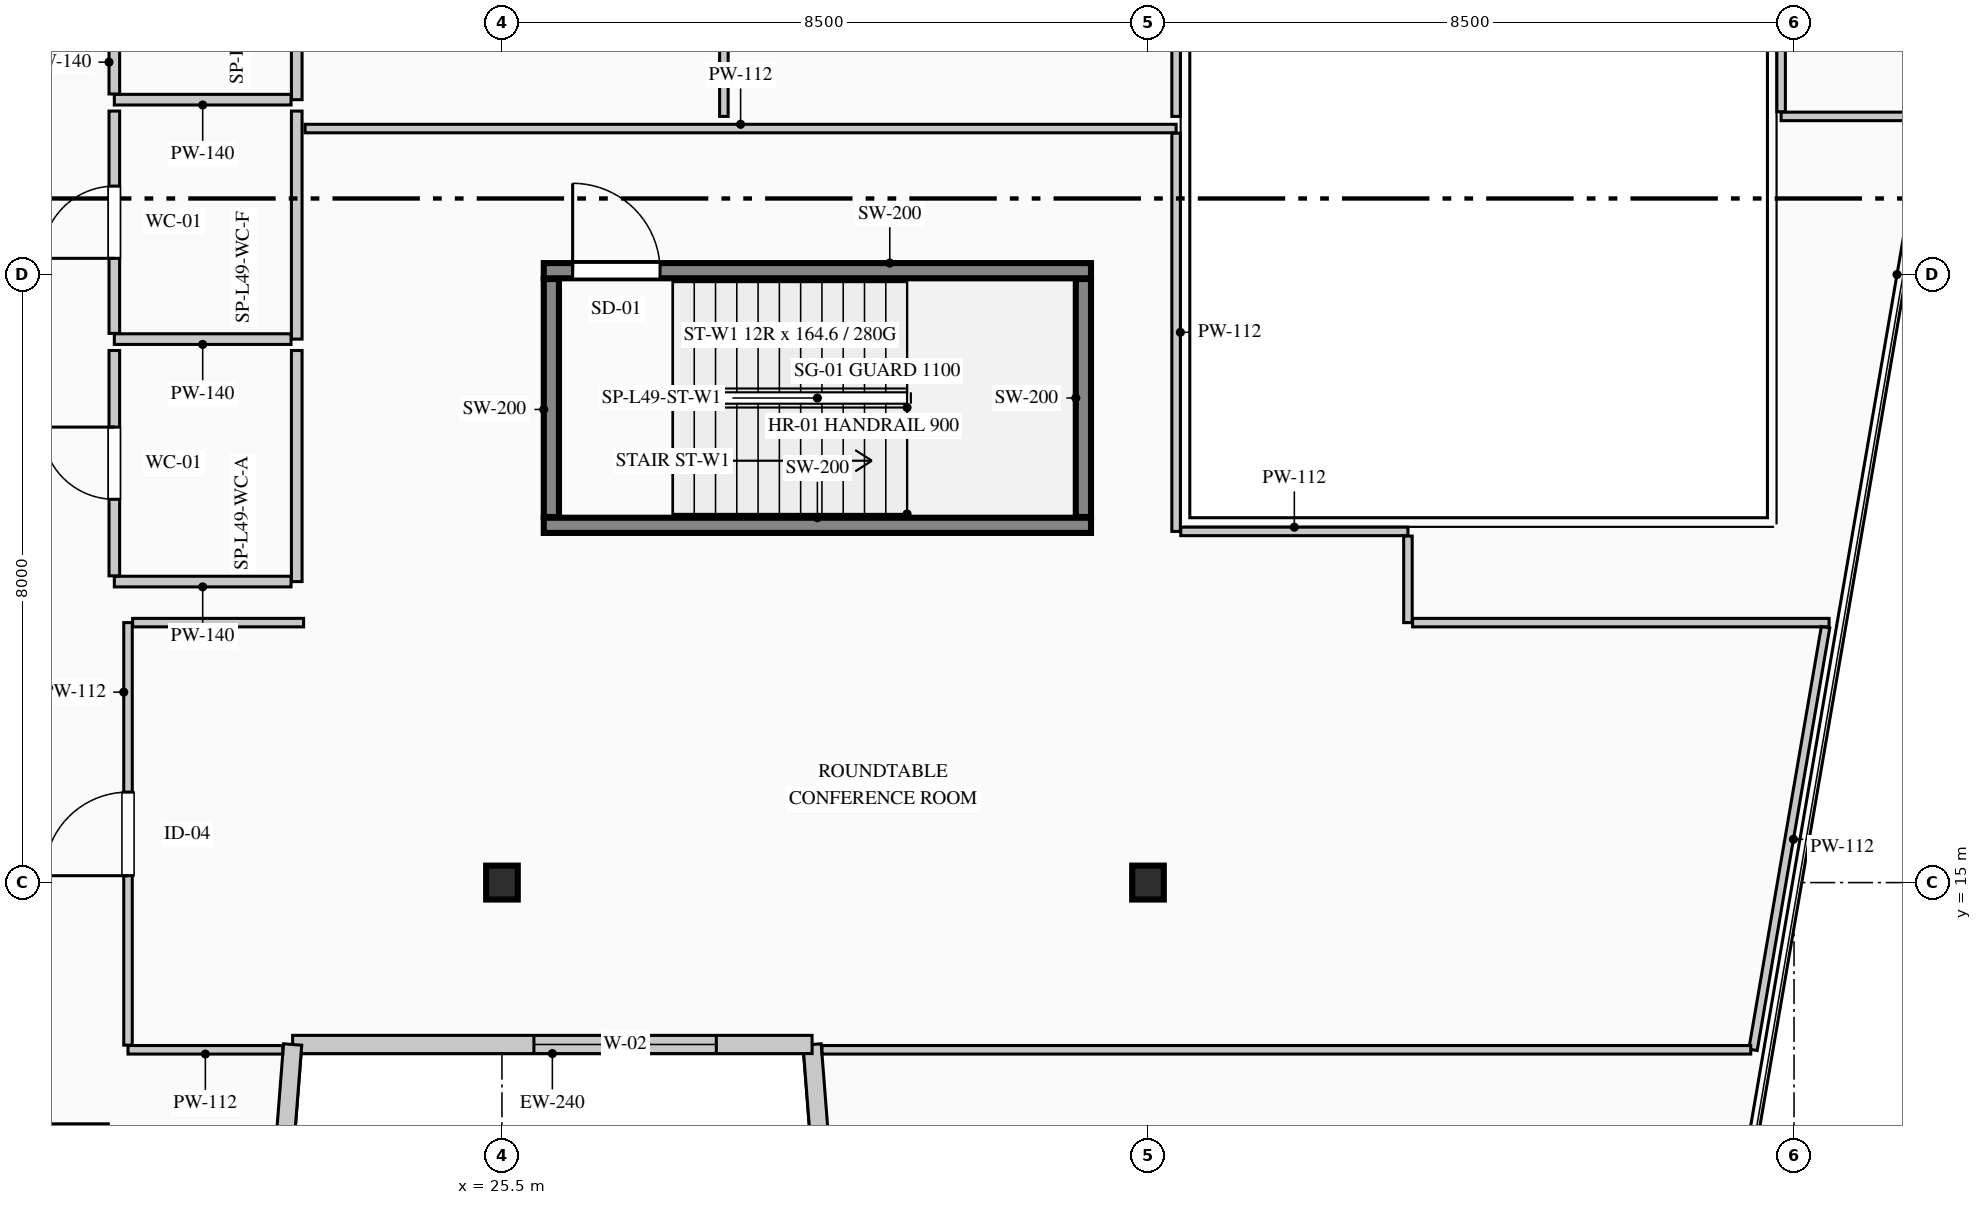
"""IFC4 building model, lengths in metres.
Left out: names, types, materials, properties, quantities, classifications, styles, units other than length and angle.
Written with IfcOpenShell. Run it as: python <this file> out.ifc"""

import sys

from ifc_helpers import new_model, si_unit, direction, frame, frame_2d, origin, origin_2d, place, context, subcontext, project, spatial, rectangle, i_section, extrude, element, fill, save


model = new_model("IFC4")
c1 = context("Model", 3, precision=1e-05, world=origin(), true_north=direction((0.0, 1.0)))
c2 = subcontext(c1, "Body", "Model", "MODEL_VIEW")
j1 = project(units=[si_unit("LENGTHUNIT", "METRE"), si_unit("PLANEANGLEUNIT", "RADIAN")], contexts=[c1])
p1 = place(None, origin())
s1 = spatial("IfcSite", under=j1, at=p1, CompositionType="ELEMENT")
p2 = place(p1, origin())
s2 = spatial("IfcBuilding", under=s1, at=p2, CompositionType="ELEMENT")
p3 = place(p2, frame((0.0, 0.0, 207.45)))
s3 = spatial("IfcBuildingStorey", under=s2, at=p3, CompositionType="ELEMENT", Elevation=207.45)
p4 = place(p3, frame((26.05, 19.7, 0.0), z_axis=(0.0, 0.0, 1.0), x_axis=(1.0, 0.0, 0.0)))
e1 = element("IfcWall", 1, at=p4, inside=s3, PredefinedType="SHEAR", context=c2, shape_type="SweptSolid", body=[
    extrude(rectangle(XDim=7.2, YDim=0.2, at=frame_2d((3.6, 0.0))), origin(), (0.0, 0.0, 1.0), 3.95),
])
p5 = place(p3, frame((26.05, 23.05, 0.0), z_axis=(0.0, 0.0, 1.0), x_axis=(1.0, 0.0, 0.0)))
e2 = element("IfcWall", 2, at=p5, inside=s3, PredefinedType="SHEAR", context=c2, shape_type="SweptSolid", body=[
    extrude(rectangle(XDim=7.2, YDim=0.2, at=frame_2d((3.6, 0.0))), origin(), (0.0, 0.0, 1.0), 3.95),
])
p6 = place(p5, frame((0.38, 0.0, 0.0)))
e3 = element("IfcOpeningElement", 3, at=p6, cuts=e2, PredefinedType="OPENING", context=c2, shape_type="SweptSolid", body=[
    extrude(rectangle(XDim=1.15, YDim=2.2, at=frame_2d((0.575, 1.1))), frame((0.0, 0.11, 0.0), z_axis=(0.0, -1.0, 0.0), x_axis=(1.0, 0.0, 0.0)), (0.0, 0.0, 1.0), 0.22),
])
for number, where, z_axis, x_axis in (
    (4, (26.15, 19.81, 0.0), (0.0, 0.0, 1.0), (0.0, 1.0, 0.0)),
    (5, (33.15, 19.81, 0.0), (0.0, 0.0, 1.0), (0.0, 1.0, 0.0)),
):
    element("IfcWall", number, at=place(p3, frame(where, z_axis=z_axis, x_axis=x_axis)), inside=s3, PredefinedType="SHEAR", context=c2, shape_type="SweptSolid", body=[
        extrude(rectangle(XDim=3.13, YDim=0.2, at=frame_2d((1.565, 0.0))), origin(), (0.0, 0.0, 1.0), 3.95),
    ])
for number, where, z_axis, x_axis in (
    (6, (25.5, 15.0, 0.0), (0.0, 0.0, 1.0), (1.0, 0.0, 0.0)),
    (7, (34.0, 15.0, 0.0), (0.0, 0.0, 1.0), (1.0, 0.0, 0.0)),
):
    element("IfcColumn", number, at=place(p3, frame(where, z_axis=z_axis, x_axis=x_axis)), inside=s3, PredefinedType="COLUMN", context=c2, shape_type="SweptSolid", body=[
        extrude(i_section(OverallWidth=0.416, OverallDepth=0.446, WebThickness=0.039, FlangeThickness=0.063, FilletRadius=0.015, at=origin_2d()), origin(), (0.0, 0.0, 1.0), 3.95),
    ])
p7 = place(p3, frame((30.381, 2.62, 0.0), z_axis=(0.0, 0.0, 1.0), x_axis=(-0.077816860153, 0.996967670627, 0.0)))
e8 = element("IfcWall", 8, at=p7, inside=s3, PredefinedType="STANDARD", context=c2, shape_type="SweptSolid", body=[
    extrude(rectangle(XDim=10.281, YDim=0.24, at=frame_2d((5.141, 0.0))), origin(), (0.0, 0.0, 1.0), 3.7),
])
p8 = place(p7, frame((5.38, 0.0, 0.9)))
e9 = element("IfcOpeningElement", 9, at=p8, cuts=e8, PredefinedType="OPENING", context=c2, shape_type="SweptSolid", body=[
    extrude(rectangle(XDim=2.4, YDim=2.1, at=frame_2d((1.2, 1.05))), frame((0.0, 0.13, 0.0), z_axis=(0.0, -1.0, 0.0), x_axis=(1.0, 0.0, 0.0)), (0.0, 0.0, 1.0), 0.26),
])
p9 = place(p3, frame((29.581, 12.87, 0.0), z_axis=(0.0, 0.0, 1.0), x_axis=(-1.0, 0.0, 0.0)))
e10 = element("IfcWall", 10, at=p9, inside=s3, PredefinedType="STANDARD", context=c2, shape_type="SweptSolid", body=[
    extrude(rectangle(XDim=6.834, YDim=0.24, at=frame_2d((3.417, 0.0))), origin(), (0.0, 0.0, 1.0), 3.7),
])
p10 = place(p9, frame((1.26, 0.0, 0.9)))
e11 = element("IfcOpeningElement", 11, at=p10, cuts=e10, PredefinedType="OPENING", context=c2, shape_type="SweptSolid", body=[
    extrude(rectangle(XDim=2.4, YDim=2.1, at=frame_2d((1.2, 1.05))), frame((0.0, 0.13, 0.0), z_axis=(0.0, -1.0, 0.0), x_axis=(1.0, 0.0, 0.0)), (0.0, 0.0, 1.0), 0.26),
])
p11 = place(p3, frame((22.746, 12.87, 0.0), z_axis=(0.0, 0.0, 1.0), x_axis=(-0.077816860153, -0.996967670627, 0.0)))
e12 = element("IfcWall", 12, at=p11, inside=s3, PredefinedType="STANDARD", context=c2, shape_type="SweptSolid", body=[
    extrude(rectangle(XDim=10.281, YDim=0.24, at=frame_2d((5.141, 0.0))), origin(), (0.0, 0.0, 1.0), 3.7),
])
p12 = place(p11, frame((2.501, 0.0, 0.9)))
e13 = element("IfcOpeningElement", 13, at=p12, cuts=e12, PredefinedType="OPENING", context=c2, shape_type="SweptSolid", body=[
    extrude(rectangle(XDim=2.4, YDim=2.1, at=frame_2d((1.2, 1.05))), frame((0.0, 0.13, 0.0), z_axis=(0.0, -1.0, 0.0), x_axis=(1.0, 0.0, 0.0)), (0.0, 0.0, 1.0), 0.26),
])
p13 = place(p3, frame((22.8, 28.95, 0.0), z_axis=(0.0, 0.0, 1.0), x_axis=(0.0, -1.0, 0.0)))
e14 = element("IfcWall", 14, at=p13, inside=s3, PredefinedType="PARTITIONING", context=c2, shape_type="SweptSolid", body=[
    extrude(rectangle(XDim=3.65, YDim=0.14, at=frame_2d((1.825, 0.0))), origin(), (0.0, 0.0, 1.0), 3.325),
])
p14 = place(p3, frame((22.725, 25.3, 0.0), z_axis=(0.0, 0.0, 1.0), x_axis=(-1.0, 0.0, 0.0)))
e15 = element("IfcWall", 15, at=p14, inside=s3, PredefinedType="PARTITIONING", context=c2, shape_type="SweptSolid", body=[
    extrude(rectangle(XDim=2.325, YDim=0.14, at=frame_2d((1.163, 0.0))), origin(), (0.0, 0.0, 1.0), 3.7),
])
p15 = place(p3, frame((20.4, 25.375, 0.0), z_axis=(0.0, 0.0, 1.0), x_axis=(0.0, 1.0, 0.0)))
e16 = element("IfcWall", 16, at=p15, inside=s3, PredefinedType="PARTITIONING", context=c2, shape_type="SweptSolid", body=[
    extrude(rectangle(XDim=3.575, YDim=0.14, at=frame_2d((1.788, 0.0))), origin(), (0.0, 0.0, 1.0), 3.7),
])
p16 = place(p15, frame((1.312, 0.0, 0.0)))
e17 = element("IfcOpeningElement", 17, at=p16, cuts=e16, PredefinedType="OPENING", context=c2, shape_type="SweptSolid", body=[
    extrude(rectangle(XDim=0.95, YDim=2.15, at=frame_2d((0.475, 1.075))), frame((0.0, 0.08, 0.0), z_axis=(0.0, -1.0, 0.0), x_axis=(1.0, 0.0, 0.0)), (0.0, 0.0, 1.0), 0.16),
])
p17 = place(p3, frame((22.8, 25.15, 0.0), z_axis=(0.0, 0.0, 1.0), x_axis=(0.0, -1.0, 0.0)))
e18 = element("IfcWall", 18, at=p17, inside=s3, PredefinedType="PARTITIONING", context=c2, shape_type="SweptSolid", body=[
    extrude(rectangle(XDim=3.0, YDim=0.14, at=frame_2d((1.5, 0.0))), origin(), (0.0, 0.0, 1.0), 3.325),
])
p18 = place(p3, frame((22.725, 22.15, 0.0), z_axis=(0.0, 0.0, 1.0), x_axis=(-1.0, 0.0, 0.0)))
e19 = element("IfcWall", 19, at=p18, inside=s3, PredefinedType="PARTITIONING", context=c2, shape_type="SweptSolid", body=[
    extrude(rectangle(XDim=2.325, YDim=0.14, at=frame_2d((1.163, 0.0))), origin(), (0.0, 0.0, 1.0), 3.7),
])
p19 = place(p3, frame((20.4, 22.225, 0.0), z_axis=(0.0, 0.0, 1.0), x_axis=(0.0, 1.0, 0.0)))
e20 = element("IfcWall", 20, at=p19, inside=s3, PredefinedType="PARTITIONING", context=c2, shape_type="SweptSolid", body=[
    extrude(rectangle(XDim=2.925, YDim=0.14, at=frame_2d((1.462, 0.0))), origin(), (0.0, 0.0, 1.0), 3.7),
])
p20 = place(p19, frame((0.988, 0.0, 0.0)))
e21 = element("IfcOpeningElement", 21, at=p20, cuts=e20, PredefinedType="OPENING", context=c2, shape_type="SweptSolid", body=[
    extrude(rectangle(XDim=0.95, YDim=2.15, at=frame_2d((0.475, 1.075))), frame((0.0, 0.08, 0.0), z_axis=(0.0, -1.0, 0.0), x_axis=(1.0, 0.0, 0.0)), (0.0, 0.0, 1.0), 0.16),
])
p21 = place(p3, frame((22.8, 22.0, 0.0), z_axis=(0.0, 0.0, 1.0), x_axis=(0.0, -1.0, 0.0)))
e22 = element("IfcWall", 22, at=p21, inside=s3, PredefinedType="PARTITIONING", context=c2, shape_type="SweptSolid", body=[
    extrude(rectangle(XDim=3.04, YDim=0.14, at=frame_2d((1.52, 0.0))), origin(), (0.0, 0.0, 1.0), 3.325),
])
p22 = place(p3, frame((22.725, 18.96, 0.0), z_axis=(0.0, 0.0, 1.0), x_axis=(-1.0, 0.0, 0.0)))
e23 = element("IfcWall", 23, at=p22, inside=s3, PredefinedType="PARTITIONING", context=c2, shape_type="SweptSolid", body=[
    extrude(rectangle(XDim=2.325, YDim=0.14, at=frame_2d((1.163, 0.0))), origin(), (0.0, 0.0, 1.0), 3.7),
])
p23 = place(p3, frame((20.4, 19.035, 0.0), z_axis=(0.0, 0.0, 1.0), x_axis=(0.0, 1.0, 0.0)))
e24 = element("IfcWall", 24, at=p23, inside=s3, PredefinedType="PARTITIONING", context=c2, shape_type="SweptSolid", body=[
    extrude(rectangle(XDim=2.965, YDim=0.14, at=frame_2d((1.482, 0.0))), origin(), (0.0, 0.0, 1.0), 3.7),
])
p24 = place(p23, frame((1.008, 0.0, 0.0)))
e25 = element("IfcOpeningElement", 25, at=p24, cuts=e24, PredefinedType="OPENING", context=c2, shape_type="SweptSolid", body=[
    extrude(rectangle(XDim=0.95, YDim=2.15, at=frame_2d((0.475, 1.075))), frame((0.0, 0.08, 0.0), z_axis=(0.0, -1.0, 0.0), x_axis=(1.0, 0.0, 0.0)), (0.0, 0.0, 1.0), 0.16),
])
p25 = place(p3, frame((11.341, 11.77, 0.0), z_axis=(0.0, 0.0, 1.0), x_axis=(1.0, 0.0, 0.0)))
e26 = element("IfcWall", 26, at=p25, inside=s3, PredefinedType="PARTITIONING", context=c2, shape_type="SweptSolid", body=[
    extrude(rectangle(XDim=8.979, YDim=0.112, at=frame_2d((4.49, 0.0))), origin(), (0.0, 0.0, 1.0), 3.7),
])
p26 = place(p25, frame((3.939, 0.0, 0.0)))
e27 = element("IfcOpeningElement", 27, at=p26, cuts=e26, PredefinedType="OPENING", context=c2, shape_type="SweptSolid", body=[
    extrude(rectangle(XDim=1.1, YDim=2.2, at=frame_2d((0.55, 1.1))), frame((0.0, 0.066, 0.0), z_axis=(0.0, -1.0, 0.0), x_axis=(1.0, 0.0, 0.0)), (0.0, 0.0, 1.0), 0.132),
])
p27 = place(p3, frame((22.615, 12.8, 0.0), z_axis=(0.0, 0.0, 1.0), x_axis=(-1.0, 0.0, 0.0)))
e28 = element("IfcWall", 28, at=p27, inside=s3, PredefinedType="PARTITIONING", context=c2, shape_type="SweptSolid", body=[
    extrude(rectangle(XDim=2.035, YDim=0.112, at=frame_2d((1.018, 0.0))), origin(), (0.0, 0.0, 1.0), 3.7),
])
p28 = place(p3, frame((20.58, 12.861, 0.0), z_axis=(0.0, 0.0, 1.0), x_axis=(0.0, 1.0, 0.0)))
e29 = element("IfcWall", 29, at=p28, inside=s3, PredefinedType="PARTITIONING", context=c2, shape_type="SweptSolid", body=[
    extrude(rectangle(XDim=5.559, YDim=0.112, at=frame_2d((2.779, 0.0))), origin(), (0.0, 0.0, 1.0), 3.7),
])
p29 = place(p28, frame((2.229, 0.0, 0.0)))
e30 = element("IfcOpeningElement", 30, at=p29, cuts=e29, PredefinedType="OPENING", context=c2, shape_type="SweptSolid", body=[
    extrude(rectangle(XDim=1.1, YDim=2.2, at=frame_2d((0.55, 1.1))), frame((0.0, 0.066, 0.0), z_axis=(0.0, -1.0, 0.0), x_axis=(1.0, 0.0, 0.0)), (0.0, 0.0, 1.0), 0.132),
])
p30 = place(p3, frame((20.641, 18.42, 0.0), z_axis=(0.0, 0.0, 1.0), x_axis=(1.0, 0.0, 0.0)))
e31 = element("IfcWall", 31, at=p30, inside=s3, PredefinedType="PARTITIONING", context=c2, shape_type="SweptSolid", body=[
    extrude(rectangle(XDim=2.249, YDim=0.112, at=frame_2d((1.125, 0.0))), origin(), (0.0, 0.0, 1.0), 3.7),
])
p31 = place(p3, frame((22.91, 24.92, 0.0), z_axis=(0.0, 0.0, 1.0), x_axis=(1.0, 0.0, 0.0)))
e32 = element("IfcWall", 32, at=p31, inside=s3, PredefinedType="PARTITIONING", context=c2, shape_type="SweptSolid", body=[
    extrude(rectangle(XDim=11.46, YDim=0.112, at=frame_2d((5.73, 0.0))), origin(), (0.0, 0.0, 1.0), 3.325),
])
p32 = place(p3, frame((34.37, 24.859, 0.0), z_axis=(0.0, 0.0, 1.0), x_axis=(0.0, -1.0, 0.0)))
e33 = element("IfcWall", 33, at=p32, inside=s3, PredefinedType="PARTITIONING", context=c2, shape_type="SweptSolid", body=[
    extrude(rectangle(XDim=5.239, YDim=0.112, at=frame_2d((2.619, 0.0))), origin(), (0.0, 0.0, 1.0), 3.7),
])
p33 = place(p3, frame((34.431, 19.62, 0.0), z_axis=(0.0, 0.0, 1.0), x_axis=(1.0, 0.0, 0.0)))
e34 = element("IfcWall", 34, at=p33, inside=s3, PredefinedType="PARTITIONING", context=c2, shape_type="SweptSolid", body=[
    extrude(rectangle(XDim=2.989, YDim=0.112, at=frame_2d((1.495, 0.0))), origin(), (0.0, 0.0, 1.0), 3.7),
])
p34 = place(p3, frame((37.42, 19.559, 0.0), z_axis=(0.0, 0.0, 1.0), x_axis=(0.0, -1.0, 0.0)))
e35 = element("IfcWall", 35, at=p34, inside=s3, PredefinedType="PARTITIONING", context=c2, shape_type="SweptSolid", body=[
    extrude(rectangle(XDim=1.139, YDim=0.112, at=frame_2d((0.57, 0.0))), origin(), (0.0, 0.0, 1.0), 3.7),
])
p35 = place(p3, frame((37.481, 18.42, 0.0), z_axis=(0.0, 0.0, 1.0), x_axis=(1.0, 0.0, 0.0)))
e36 = element("IfcWall", 36, at=p35, inside=s3, PredefinedType="PARTITIONING", context=c2, shape_type="SweptSolid", body=[
    extrude(rectangle(XDim=5.48, YDim=0.112, at=frame_2d((2.74, 0.0))), origin(), (0.0, 0.0, 1.0), 3.7),
])
p36 = place(p3, frame((42.915, 18.359, 0.0), z_axis=(0.0, 0.0, 1.0), x_axis=(-0.169247345334, -0.985573607651, 0.0)))
e37 = element("IfcWall", 37, at=p36, inside=s3, PredefinedType="PARTITIONING", context=c2, shape_type="SweptSolid", body=[
    extrude(rectangle(XDim=5.64, YDim=0.112, at=frame_2d((2.82, 0.0))), origin(), (0.0, 0.0, 1.0), 3.7),
])
p37 = place(p3, frame((41.93, 12.8, 0.0), z_axis=(0.0, 0.0, 1.0), x_axis=(-1.0, 0.0, 0.0)))
e38 = element("IfcWall", 38, at=p37, inside=s3, PredefinedType="PARTITIONING", context=c2, shape_type="SweptSolid", body=[
    extrude(rectangle(XDim=12.219, YDim=0.112, at=frame_2d((6.11, 0.0))), origin(), (0.0, 0.0, 1.0), 3.7),
])
p38 = place(p3, frame((28.42, 28.959, 0.0), z_axis=(0.0, 0.0, 1.0), x_axis=(0.0, -1.0, 0.0)))
e39 = element("IfcWall", 39, at=p38, inside=s3, PredefinedType="PARTITIONING", context=c2, shape_type="SweptSolid", body=[
    extrude(rectangle(XDim=3.879, YDim=0.112, at=frame_2d((1.939, 0.0))), origin(), (0.0, 0.0, 1.0), 3.7),
])
p39 = place(p3, frame((34.37, 28.6, 0.0), z_axis=(0.0, 0.0, 1.0), x_axis=(0.0, -1.0, 0.0)))
e40 = element("IfcWall", 40, at=p39, inside=s3, PredefinedType="PARTITIONING", context=c2, shape_type="SweptSolid", body=[
    extrude(rectangle(XDim=3.52, YDim=0.112, at=frame_2d((1.76, 0.0))), origin(), (0.0, 0.0, 1.0), 3.7),
])
p40 = place(p3, frame((44.041, 25.08, 0.0), z_axis=(0.0, 0.0, 1.0), x_axis=(-1.0, 0.0, 0.0)))
e41 = element("IfcWall", 41, at=p40, inside=s3, PredefinedType="PARTITIONING", context=c2, shape_type="SweptSolid", body=[
    extrude(rectangle(XDim=1.71, YDim=0.112, at=frame_2d((0.855, 0.0))), origin(), (0.0, 0.0, 1.0), 3.7),
])
p41 = place(p3, frame((42.33, 25.141, 0.0), z_axis=(0.0, 0.0, 1.0), x_axis=(0.0, 1.0, 0.0)))
e42 = element("IfcWall", 42, at=p41, inside=s3, PredefinedType="PARTITIONING", context=c2, shape_type="SweptSolid", body=[
    extrude(rectangle(XDim=3.489, YDim=0.112, at=frame_2d((1.744, 0.0))), origin(), (0.0, 0.0, 1.0), 3.7),
])
p42 = place(p10, origin())
e43 = element("IfcWindow", 43, at=p42, inside=s3, PartitioningType="DOUBLE_PANEL_VERTICAL", PredefinedType="WINDOW", context=c2, shape_type="SweptSolid", body=[
    extrude(rectangle(XDim=2.4, YDim=2.1, at=frame_2d((1.2, 1.05))), frame((0.0, 0.03, 0.0), z_axis=(0.0, -1.0, 0.0), x_axis=(1.0, 0.0, 0.0)), (0.0, 0.0, 1.0), 0.06),
])
fill(e11, e43)
p43 = place(p6, origin())
e44 = element("IfcDoor", 44, at=p43, inside=s3, OperationType="SINGLE_SWING_LEFT", PredefinedType="DOOR", context=c2, shape_type="SweptSolid", body=[
    extrude(rectangle(XDim=1.15, YDim=2.2, at=frame_2d((0.575, 1.1))), frame((0.0, 0.025, 0.0), z_axis=(0.0, -1.0, 0.0), x_axis=(1.0, 0.0, 0.0)), (0.0, 0.0, 1.0), 0.05),
])
fill(e3, e44)
p44 = place(p20, origin())
e45 = element("IfcDoor", 45, at=p44, inside=s3, OperationType="SINGLE_SWING_LEFT", PredefinedType="DOOR", context=c2, shape_type="SweptSolid", body=[
    extrude(rectangle(XDim=0.95, YDim=2.15, at=frame_2d((0.475, 1.075))), frame((0.0, 0.025, 0.0), z_axis=(0.0, -1.0, 0.0), x_axis=(1.0, 0.0, 0.0)), (0.0, 0.0, 1.0), 0.05),
])
fill(e21, e45)
p45 = place(p24, origin())
e46 = element("IfcDoor", 46, at=p45, inside=s3, OperationType="SINGLE_SWING_RIGHT", PredefinedType="DOOR", context=c2, shape_type="SweptSolid", body=[
    extrude(rectangle(XDim=0.95, YDim=2.15, at=frame_2d((0.475, 1.075))), frame((0.0, 0.025, 0.0), z_axis=(0.0, -1.0, 0.0), x_axis=(1.0, 0.0, 0.0)), (0.0, 0.0, 1.0), 0.05),
])
fill(e25, e46)
p46 = place(p29, origin())
e47 = element("IfcDoor", 47, at=p46, inside=s3, OperationType="SINGLE_SWING_LEFT", PredefinedType="DOOR", context=c2, shape_type="SweptSolid", body=[
    extrude(rectangle(XDim=1.1, YDim=2.2, at=frame_2d((0.55, 1.1))), frame((0.0, 0.025, 0.0), z_axis=(0.0, -1.0, 0.0), x_axis=(1.0, 0.0, 0.0)), (0.0, 0.0, 1.0), 0.05),
])
fill(e30, e47)
save(model, sys.argv[1])
